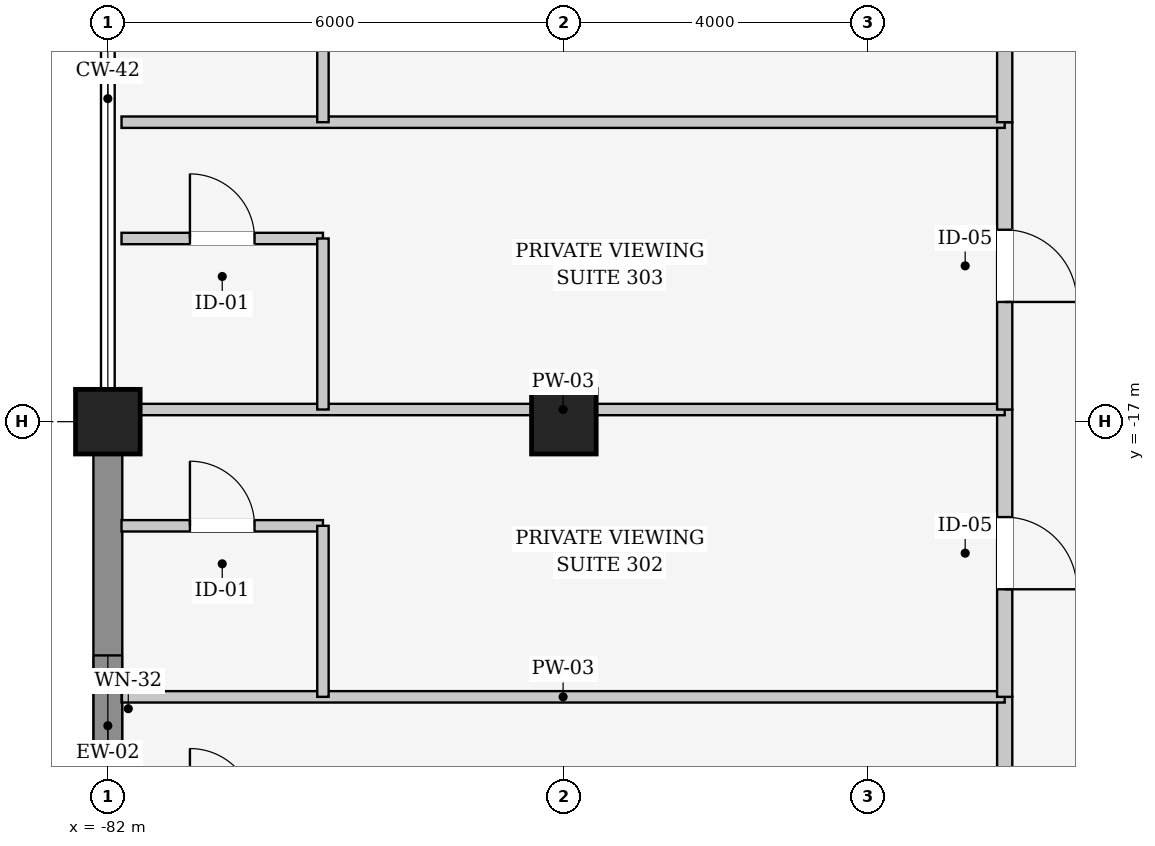
"""IFC4 building model, lengths in metres.
Left out: names, types, materials, properties, quantities, classifications, styles, units other than length and angle.
Written with IfcOpenShell. Run it as: python <this file> out.ifc"""

import sys

from ifc_helpers import new_model, si_unit, direction, frame, frame_2d, origin, origin_2d, place, context, subcontext, project, spatial, rectangle, extrude, element, fill, save


model = new_model("IFC4")
c1 = context("Model", 3, precision=1e-05, world=origin(), true_north=direction((0.0, 1.0)))
c2 = subcontext(c1, "Body", "Model", "MODEL_VIEW")
j1 = project(units=[si_unit("LENGTHUNIT", "METRE"), si_unit("PLANEANGLEUNIT", "RADIAN")], contexts=[c1])
p1 = place(None, origin())
s1 = spatial("IfcSite", under=j1, at=p1, CompositionType="ELEMENT")
p2 = place(p1, origin())
s2 = spatial("IfcBuilding", under=s1, at=p2, CompositionType="ELEMENT")
p3 = place(p2, frame((0.0, 0.0, 16.2)))
s3 = spatial("IfcBuildingStorey", under=s2, at=p3, CompositionType="ELEMENT", Elevation=16.2)
for number, where, z_axis, x_axis in (
    (1, (-82.0, -17.0, 0.0), (0.0, 0.0, 1.0), (1.0, 0.0, 0.0)),
    (2, (-76.0, -17.0, 0.0), (0.0, 0.0, 1.0), (1.0, 0.0, 0.0)),
):
    element("IfcColumn", number, at=place(p3, frame(where, z_axis=z_axis, x_axis=x_axis)), inside=s3, PredefinedType="COLUMN", context=c2, shape_type="SweptSolid", body=[
        extrude(rectangle(XDim=0.85, YDim=0.85, at=origin_2d()), origin(), (0.0, 0.0, 1.0), 4.8),
    ])
p4 = place(p3, frame((-82.0, -24.593, 0.0), z_axis=(0.0, 0.0, 1.0), x_axis=(0.0, 1.0, 0.0)))
e3 = element("IfcWall", 3, at=p4, inside=s3, PredefinedType="SOLIDWALL", context=c2, shape_type="SweptSolid", body=[
    extrude(rectangle(XDim=7.186, YDim=0.38, at=frame_2d((3.593, 0.0))), origin(), (0.0, 0.0, 1.0), 3.76),
])
p5 = place(p4, frame((2.668, 0.0, 0.9)))
e4 = element("IfcOpeningElement", 4, at=p5, cuts=e3, PredefinedType="OPENING", context=c2, shape_type="SweptSolid", body=[
    extrude(rectangle(XDim=1.85, YDim=2.0, at=frame_2d((0.925, 1.0))), frame((0.0, 0.2, 0.0), z_axis=(0.0, -1.0, 0.0), x_axis=(1.0, 0.0, 0.0)), (0.0, 0.0, 1.0), 0.4),
])
p6 = place(p3, frame((-70.2, -20.62, 0.0), z_axis=(0.0, 0.0, 1.0), x_axis=(0.0, -1.0, 0.0)))
e5 = element("IfcWall", 5, at=p6, inside=s3, PredefinedType="PARTITIONING", context=c2, shape_type="SweptSolid", body=[
    extrude(rectangle(XDim=3.78, YDim=0.2, at=frame_2d((1.89, 0.0))), origin(), (0.0, 0.0, 1.0), 4.182),
])
p7 = place(p6, frame((1.415, 0.0, 0.0)))
e6 = element("IfcOpeningElement", 6, at=p7, cuts=e5, PredefinedType="OPENING", context=c2, shape_type="SweptSolid", body=[
    extrude(rectangle(XDim=0.95, YDim=2.25, at=frame_2d((0.475, 1.125))), frame((0.0, 0.11, 0.0), z_axis=(0.0, -1.0, 0.0), x_axis=(1.0, 0.0, 0.0)), (0.0, 0.0, 1.0), 0.22),
])
p8 = place(p3, frame((-81.82, -20.62, 0.0), z_axis=(0.0, 0.0, 1.0), x_axis=(1.0, 0.0, 0.0)))
e7 = element("IfcWall", 7, at=p8, inside=s3, PredefinedType="PARTITIONING", context=c2, shape_type="SweptSolid", body=[
    extrude(rectangle(XDim=11.62, YDim=0.15, at=frame_2d((5.81, 0.0))), origin(), (0.0, 0.0, 1.0), 3.845),
])
p9 = place(p3, frame((-81.82, -18.37, 0.0), z_axis=(0.0, 0.0, 1.0), x_axis=(1.0, 0.0, 0.0)))
e8 = element("IfcWall", 8, at=p9, inside=s3, PredefinedType="PARTITIONING", context=c2, shape_type="SweptSolid", body=[
    extrude(rectangle(XDim=2.65, YDim=0.15, at=frame_2d((1.325, 0.0))), origin(), (0.0, 0.0, 1.0), 3.845),
])
p10 = place(p9, frame((0.9, 0.0, 0.0)))
e9 = element("IfcOpeningElement", 9, at=p10, cuts=e8, PredefinedType="OPENING", context=c2, shape_type="SweptSolid", body=[
    extrude(rectangle(XDim=0.85, YDim=2.15, at=frame_2d((0.425, 1.075))), frame((0.0, 0.085, 0.0), z_axis=(0.0, -1.0, 0.0), x_axis=(1.0, 0.0, 0.0)), (0.0, 0.0, 1.0), 0.17),
])
p11 = place(p3, frame((-79.17, -18.37, 0.0), z_axis=(0.0, 0.0, 1.0), x_axis=(0.0, -1.0, 0.0)))
e10 = element("IfcWall", 10, at=p11, inside=s3, PredefinedType="PARTITIONING", context=c2, shape_type="SweptSolid", body=[
    extrude(rectangle(XDim=2.25, YDim=0.15, at=frame_2d((1.125, 0.0))), origin(), (0.0, 0.0, 1.0), 4.44),
])
p12 = place(p3, frame((-70.2, -16.84, 0.0), z_axis=(0.0, 0.0, 1.0), x_axis=(0.0, -1.0, 0.0)))
e11 = element("IfcWall", 11, at=p12, inside=s3, PredefinedType="PARTITIONING", context=c2, shape_type="SweptSolid", body=[
    extrude(rectangle(XDim=3.78, YDim=0.2, at=frame_2d((1.89, 0.0))), origin(), (0.0, 0.0, 1.0), 3.545),
])
p13 = place(p12, frame((1.415, 0.0, 0.0)))
e12 = element("IfcOpeningElement", 12, at=p13, cuts=e11, PredefinedType="OPENING", context=c2, shape_type="SweptSolid", body=[
    extrude(rectangle(XDim=0.95, YDim=2.25, at=frame_2d((0.475, 1.125))), frame((0.0, 0.11, 0.0), z_axis=(0.0, -1.0, 0.0), x_axis=(1.0, 0.0, 0.0)), (0.0, 0.0, 1.0), 0.22),
])
p14 = place(p3, frame((-81.82, -16.84, 0.0), z_axis=(0.0, 0.0, 1.0), x_axis=(1.0, 0.0, 0.0)))
e13 = element("IfcWall", 13, at=p14, inside=s3, PredefinedType="PARTITIONING", context=c2, shape_type="SweptSolid", body=[
    extrude(rectangle(XDim=11.62, YDim=0.15, at=frame_2d((5.81, 0.0))), origin(), (0.0, 0.0, 1.0), 3.545),
])
p15 = place(p3, frame((-81.82, -14.59, 0.0), z_axis=(0.0, 0.0, 1.0), x_axis=(1.0, 0.0, 0.0)))
e14 = element("IfcWall", 14, at=p15, inside=s3, PredefinedType="PARTITIONING", context=c2, shape_type="SweptSolid", body=[
    extrude(rectangle(XDim=2.65, YDim=0.15, at=frame_2d((1.325, 0.0))), origin(), (0.0, 0.0, 1.0), 3.845),
])
p16 = place(p15, frame((0.9, 0.0, 0.0)))
e15 = element("IfcOpeningElement", 15, at=p16, cuts=e14, PredefinedType="OPENING", context=c2, shape_type="SweptSolid", body=[
    extrude(rectangle(XDim=0.85, YDim=2.15, at=frame_2d((0.425, 1.075))), frame((0.0, 0.085, 0.0), z_axis=(0.0, -1.0, 0.0), x_axis=(1.0, 0.0, 0.0)), (0.0, 0.0, 1.0), 0.17),
])
p17 = place(p3, frame((-79.17, -14.59, 0.0), z_axis=(0.0, 0.0, 1.0), x_axis=(0.0, -1.0, 0.0)))
e16 = element("IfcWall", 16, at=p17, inside=s3, PredefinedType="PARTITIONING", context=c2, shape_type="SweptSolid", body=[
    extrude(rectangle(XDim=2.25, YDim=0.15, at=frame_2d((1.125, 0.0))), origin(), (0.0, 0.0, 1.0), 3.745),
])
p18 = place(p3, frame((-70.2, -13.06, 0.0), z_axis=(0.0, 0.0, 1.0), x_axis=(0.0, -1.0, 0.0)))
e17 = element("IfcWall", 17, at=p18, inside=s3, PredefinedType="PARTITIONING", context=c2, shape_type="SweptSolid", body=[
    extrude(rectangle(XDim=3.78, YDim=0.2, at=frame_2d((1.89, 0.0))), origin(), (0.0, 0.0, 1.0), 3.545),
])
p19 = place(p18, frame((1.415, 0.0, 0.0)))
e18 = element("IfcOpeningElement", 18, at=p19, cuts=e17, PredefinedType="OPENING", context=c2, shape_type="SweptSolid", body=[
    extrude(rectangle(XDim=0.95, YDim=2.25, at=frame_2d((0.475, 1.125))), frame((0.0, 0.11, 0.0), z_axis=(0.0, -1.0, 0.0), x_axis=(1.0, 0.0, 0.0)), (0.0, 0.0, 1.0), 0.22),
])
p20 = place(p3, frame((-81.82, -13.06, 0.0), z_axis=(0.0, 0.0, 1.0), x_axis=(1.0, 0.0, 0.0)))
e19 = element("IfcWall", 19, at=p20, inside=s3, PredefinedType="PARTITIONING", context=c2, shape_type="SweptSolid", body=[
    extrude(rectangle(XDim=11.62, YDim=0.15, at=frame_2d((5.81, 0.0))), origin(), (0.0, 0.0, 1.0), 3.845),
])
p21 = place(p3, frame((-79.17, -10.81, 0.0), z_axis=(0.0, 0.0, 1.0), x_axis=(0.0, -1.0, 0.0)))
e20 = element("IfcWall", 20, at=p21, inside=s3, PredefinedType="PARTITIONING", context=c2, shape_type="SweptSolid", body=[
    extrude(rectangle(XDim=2.25, YDim=0.15, at=frame_2d((1.125, 0.0))), origin(), (0.0, 0.0, 1.0), 4.182),
])
p22 = place(p3, frame((-70.2, -9.28, 0.0), z_axis=(0.0, 0.0, 1.0), x_axis=(0.0, -1.0, 0.0)))
e21 = element("IfcWall", 21, at=p22, inside=s3, PredefinedType="PARTITIONING", context=c2, shape_type="SweptSolid", body=[
    extrude(rectangle(XDim=3.78, YDim=0.2, at=frame_2d((1.89, 0.0))), origin(), (0.0, 0.0, 1.0), 4.182),
])
p23 = place(p22, frame((1.415, 0.0, 0.0)))
e22 = element("IfcOpeningElement", 22, at=p23, cuts=e21, PredefinedType="OPENING", context=c2, shape_type="SweptSolid", body=[
    extrude(rectangle(XDim=0.95, YDim=2.25, at=frame_2d((0.475, 1.125))), frame((0.0, 0.11, 0.0), z_axis=(0.0, -1.0, 0.0), x_axis=(1.0, 0.0, 0.0)), (0.0, 0.0, 1.0), 0.22),
])
p24 = place(p5, origin())
e23 = element("IfcWindow", 23, at=p24, inside=s3, PartitioningType="SINGLE_PANEL", PredefinedType="WINDOW", context=c2, shape_type="SweptSolid", body=[
    extrude(rectangle(XDim=1.85, YDim=2.0, at=frame_2d((0.925, 1.0))), frame((0.0, 0.03, 0.0), z_axis=(0.0, -1.0, 0.0), x_axis=(1.0, 0.0, 0.0)), (0.0, 0.0, 1.0), 0.06),
])
fill(e4, e23)
p25 = place(p10, origin())
e24 = element("IfcDoor", 24, at=p25, inside=s3, OperationType="SINGLE_SWING_LEFT", PredefinedType="DOOR", context=c2, shape_type="SweptSolid", body=[
    extrude(rectangle(XDim=0.85, YDim=2.15, at=frame_2d((0.425, 1.075))), frame((0.0, 0.025, 0.0), z_axis=(0.0, -1.0, 0.0), x_axis=(1.0, 0.0, 0.0)), (0.0, 0.0, 1.0), 0.05),
])
fill(e9, e24)
p26 = place(p13, origin())
e25 = element("IfcDoor", 25, at=p26, inside=s3, OperationType="SINGLE_SWING_RIGHT", PredefinedType="DOOR", context=c2, shape_type="SweptSolid", body=[
    extrude(rectangle(XDim=0.95, YDim=2.25, at=frame_2d((0.475, 1.125))), frame((0.0, 0.025, 0.0), z_axis=(0.0, -1.0, 0.0), x_axis=(1.0, 0.0, 0.0)), (0.0, 0.0, 1.0), 0.05),
])
fill(e12, e25)
p27 = place(p16, origin())
e26 = element("IfcDoor", 26, at=p27, inside=s3, OperationType="SINGLE_SWING_LEFT", PredefinedType="DOOR", context=c2, shape_type="SweptSolid", body=[
    extrude(rectangle(XDim=0.85, YDim=2.15, at=frame_2d((0.425, 1.075))), frame((0.0, 0.025, 0.0), z_axis=(0.0, -1.0, 0.0), x_axis=(1.0, 0.0, 0.0)), (0.0, 0.0, 1.0), 0.05),
])
fill(e15, e26)
p28 = place(p19, origin())
e27 = element("IfcDoor", 27, at=p28, inside=s3, OperationType="SINGLE_SWING_RIGHT", PredefinedType="DOOR", context=c2, shape_type="SweptSolid", body=[
    extrude(rectangle(XDim=0.95, YDim=2.25, at=frame_2d((0.475, 1.125))), frame((0.0, 0.025, 0.0), z_axis=(0.0, -1.0, 0.0), x_axis=(1.0, 0.0, 0.0)), (0.0, 0.0, 1.0), 0.05),
])
fill(e18, e27)
save(model, sys.argv[1])
